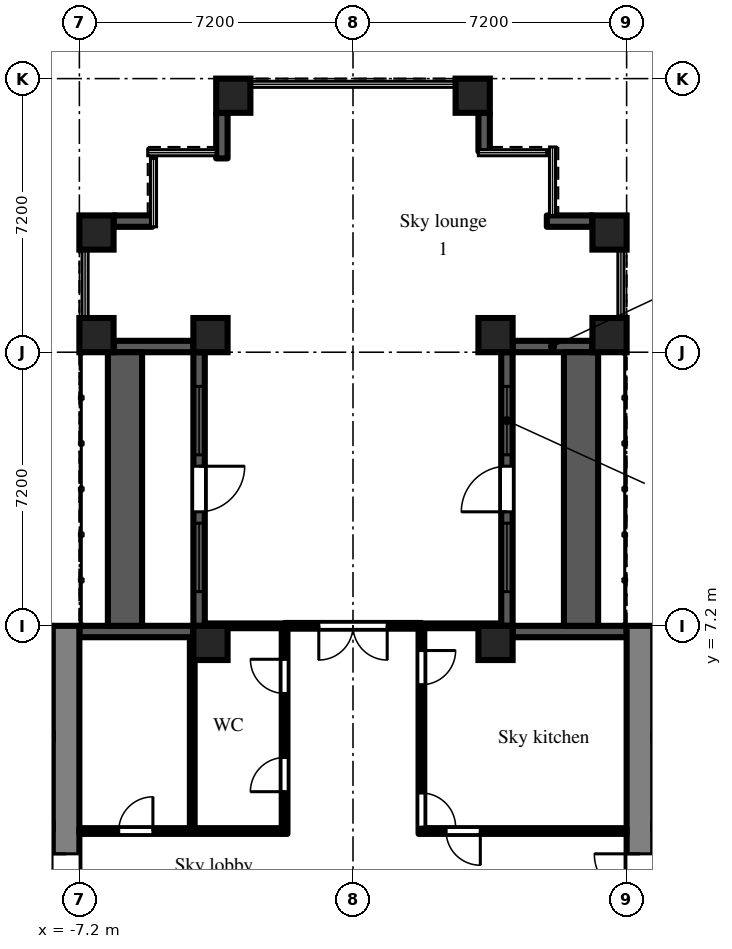
"""IFC4 building model, lengths in metres.
Left out: names, types, materials, properties, quantities, classifications, styles, units other than length and angle.
Written with IfcOpenShell. Run it as: python <this file> out.ifc"""

import sys

from ifc_helpers import new_model, si_unit, direction, frame, frame_2d, origin, origin_2d, place, context, subcontext, project, spatial, rectangle, extrude, element, fill, save


model = new_model("IFC4")
c1 = context("Model", 3, precision=1e-05, world=origin(), true_north=direction((0.0, 1.0)))
c2 = subcontext(c1, "Body", "Model", "MODEL_VIEW")
j1 = project(units=[si_unit("LENGTHUNIT", "METRE"), si_unit("PLANEANGLEUNIT", "RADIAN")], contexts=[c1])
p1 = place(None, origin())
s1 = spatial("IfcSite", under=j1, at=p1, CompositionType="ELEMENT")
p2 = place(p1, origin())
s2 = spatial("IfcBuilding", under=s1, at=p2, CompositionType="ELEMENT")
p3 = place(p2, frame((0.0, 0.0, 116.1)))
s3 = spatial("IfcBuildingStorey", under=s2, at=p3, CompositionType="ELEMENT", Elevation=116.1)
for number, where, z_axis, x_axis in (
    (1, (-6.75, 14.85, 0.0), (0.0, 0.0, 1.0), (1.0, 0.0, 0.0)),
    (2, (-6.75, 17.55, 0.0), (0.0, 0.0, 1.0), (1.0, 0.0, 0.0)),
    (3, (-3.75, 6.75, 0.0), (0.0, 0.0, 1.0), (1.0, 0.0, 0.0)),
    (4, (-3.75, 14.85, 0.0), (0.0, 0.0, 1.0), (1.0, 0.0, 0.0)),
    (5, (-3.15, 21.15, 0.0), (0.0, 0.0, 1.0), (1.0, 0.0, 0.0)),
    (6, (3.15, 21.15, 0.0), (0.0, 0.0, 1.0), (1.0, 0.0, 0.0)),
    (7, (3.75, 6.75, 0.0), (0.0, 0.0, 1.0), (1.0, 0.0, 0.0)),
    (8, (3.75, 14.85, 0.0), (0.0, 0.0, 1.0), (1.0, 0.0, 0.0)),
    (9, (6.75, 14.85, 0.0), (0.0, 0.0, 1.0), (1.0, 0.0, 0.0)),
    (10, (6.75, 17.55, 0.0), (0.0, 0.0, 1.0), (1.0, 0.0, 0.0)),
):
    element("IfcColumn", number, at=place(p3, frame(where, z_axis=z_axis, x_axis=x_axis)), inside=s3, PredefinedType="COLUMN", context=c2, shape_type="SweptSolid", body=[
        extrude(rectangle(XDim=0.9, YDim=0.9, at=origin_2d()), origin(), (0.0, 0.0, 1.0), 4.2),
    ])
p4 = place(p3, frame((7.2, 7.05, 0.0), z_axis=(0.0, 0.0, 1.0), x_axis=(-1.0, 0.0, 0.0)))
e11 = element("IfcWall", 11, at=p4, inside=s3, PredefinedType="SOLIDWALL", context=c2, shape_type="SweptSolid", body=[
    extrude(rectangle(XDim=3.0, YDim=0.3, at=frame_2d((1.5, 0.0))), origin(), (0.0, 0.0, 1.0), 3.4),
])
p5 = place(p3, frame((4.05, 7.2, 0.0), z_axis=(0.0, 0.0, 1.0), x_axis=(0.0, 1.0, 0.0)))
e12 = element("IfcWall", 12, at=p5, inside=s3, PredefinedType="SOLIDWALL", context=c2, shape_type="SweptSolid", body=[
    extrude(rectangle(XDim=7.2, YDim=0.3, at=frame_2d((3.6, 0.0))), origin(), (0.0, 0.0, 1.0), 3.4),
])
p6 = place(p5, frame((3.0, 0.0, 0.0)))
e13 = element("IfcOpeningElement", 13, at=p6, cuts=e12, PredefinedType="OPENING", context=c2, shape_type="SweptSolid", body=[
    extrude(rectangle(XDim=1.2, YDim=2.05, at=frame_2d((0.6, 1.025))), frame((0.0, 0.16, 0.0), z_axis=(0.0, -1.0, 0.0), x_axis=(1.0, 0.0, 0.0)), (0.0, 0.0, 1.0), 0.32),
])
p7 = place(p5, frame((0.9, 0.0, 0.2)))
e14 = element("IfcOpeningElement", 14, at=p7, cuts=e12, PredefinedType="OPENING", context=c2, shape_type="SweptSolid", body=[
    extrude(rectangle(XDim=1.8, YDim=1.85, at=frame_2d((0.9, 0.925))), frame((0.0, 0.16, 0.0), z_axis=(0.0, -1.0, 0.0), x_axis=(1.0, 0.0, 0.0)), (0.0, 0.0, 1.0), 0.32),
])
p8 = place(p5, frame((4.5, 0.0, 0.2)))
e15 = element("IfcOpeningElement", 15, at=p8, cuts=e12, PredefinedType="OPENING", context=c2, shape_type="SweptSolid", body=[
    extrude(rectangle(XDim=1.8, YDim=1.85, at=frame_2d((0.9, 0.925))), frame((0.0, 0.16, 0.0), z_axis=(0.0, -1.0, 0.0), x_axis=(1.0, 0.0, 0.0)), (0.0, 0.0, 1.0), 0.32),
])
p9 = place(p3, frame((4.2, 14.55, 0.0), z_axis=(0.0, 0.0, 1.0), x_axis=(1.0, 0.0, 0.0)))
e16 = element("IfcWall", 16, at=p9, inside=s3, PredefinedType="SOLIDWALL", context=c2, shape_type="SweptSolid", body=[
    extrude(rectangle(XDim=2.1, YDim=0.3, at=frame_2d((1.05, 0.0))), origin(), (0.0, 0.0, 1.0), 3.4),
])
p10 = place(p3, frame((6.3, 17.85, 0.0), z_axis=(0.0, 0.0, 1.0), x_axis=(-1.0, 0.0, 0.0)))
e17 = element("IfcWall", 17, at=p10, inside=s3, PredefinedType="SOLIDWALL", context=c2, shape_type="SweptSolid", body=[
    extrude(rectangle(XDim=1.2, YDim=0.3, at=frame_2d((0.6, 0.0))), origin(), (0.0, 0.0, 1.0), 3.8),
])
p11 = place(p3, frame((3.45, 19.68, 0.0), z_axis=(0.0, 0.0, 1.0), x_axis=(0.0, 1.0, 0.0)))
e18 = element("IfcWall", 18, at=p11, inside=s3, PredefinedType="SOLIDWALL", context=c2, shape_type="SweptSolid", body=[
    extrude(rectangle(XDim=1.02, YDim=0.3, at=frame_2d((0.51, 0.0))), origin(), (0.0, 0.0, 1.0), 3.8),
])
p12 = place(p3, frame((-3.45, 20.7, 0.0), z_axis=(0.0, 0.0, 1.0), x_axis=(0.0, -1.0, 0.0)))
e19 = element("IfcWall", 19, at=p12, inside=s3, PredefinedType="SOLIDWALL", context=c2, shape_type="SweptSolid", body=[
    extrude(rectangle(XDim=1.2, YDim=0.3, at=frame_2d((0.6, 0.0))), origin(), (0.0, 0.0, 1.0), 3.8),
])
p13 = place(p3, frame((-5.28, 17.85, 0.0), z_axis=(0.0, 0.0, 1.0), x_axis=(-1.0, 0.0, 0.0)))
e20 = element("IfcWall", 20, at=p13, inside=s3, PredefinedType="SOLIDWALL", context=c2, shape_type="SweptSolid", body=[
    extrude(rectangle(XDim=1.02, YDim=0.3, at=frame_2d((0.51, 0.0))), origin(), (0.0, 0.0, 1.0), 3.8),
])
p14 = place(p3, frame((-6.3, 14.55, 0.0), z_axis=(0.0, 0.0, 1.0), x_axis=(1.0, 0.0, 0.0)))
e21 = element("IfcWall", 21, at=p14, inside=s3, PredefinedType="SOLIDWALL", context=c2, shape_type="SweptSolid", body=[
    extrude(rectangle(XDim=2.1, YDim=0.3, at=frame_2d((1.05, 0.0))), origin(), (0.0, 0.0, 1.0), 3.4),
])
p15 = place(p3, frame((-4.05, 14.4, 0.0), z_axis=(0.0, 0.0, 1.0), x_axis=(0.0, -1.0, 0.0)))
e22 = element("IfcWall", 22, at=p15, inside=s3, PredefinedType="SOLIDWALL", context=c2, shape_type="SweptSolid", body=[
    extrude(rectangle(XDim=7.2, YDim=0.3, at=frame_2d((3.6, 0.0))), origin(), (0.0, 0.0, 1.0), 3.4),
])
p16 = place(p15, frame((3.0, 0.0, 0.0)))
e23 = element("IfcOpeningElement", 23, at=p16, cuts=e22, PredefinedType="OPENING", context=c2, shape_type="SweptSolid", body=[
    extrude(rectangle(XDim=1.2, YDim=2.05, at=frame_2d((0.6, 1.025))), frame((0.0, 0.16, 0.0), z_axis=(0.0, -1.0, 0.0), x_axis=(1.0, 0.0, 0.0)), (0.0, 0.0, 1.0), 0.32),
])
p17 = place(p15, frame((0.9, 0.0, 0.2)))
e24 = element("IfcOpeningElement", 24, at=p17, cuts=e22, PredefinedType="OPENING", context=c2, shape_type="SweptSolid", body=[
    extrude(rectangle(XDim=1.8, YDim=1.85, at=frame_2d((0.9, 0.925))), frame((0.0, 0.16, 0.0), z_axis=(0.0, -1.0, 0.0), x_axis=(1.0, 0.0, 0.0)), (0.0, 0.0, 1.0), 0.32),
])
p18 = place(p15, frame((4.5, 0.0, 0.2)))
e25 = element("IfcOpeningElement", 25, at=p18, cuts=e22, PredefinedType="OPENING", context=c2, shape_type="SweptSolid", body=[
    extrude(rectangle(XDim=1.8, YDim=1.85, at=frame_2d((0.9, 0.925))), frame((0.0, 0.16, 0.0), z_axis=(0.0, -1.0, 0.0), x_axis=(1.0, 0.0, 0.0)), (0.0, 0.0, 1.0), 0.32),
])
p19 = place(p3, frame((-4.2, 7.05, 0.0), z_axis=(0.0, 0.0, 1.0), x_axis=(-1.0, 0.0, 0.0)))
e26 = element("IfcWall", 26, at=p19, inside=s3, PredefinedType="SOLIDWALL", context=c2, shape_type="SweptSolid", body=[
    extrude(rectangle(XDim=3.0, YDim=0.3, at=frame_2d((1.5, 0.0))), origin(), (0.0, 0.0, 1.0), 3.4),
])
for number, where, z_axis, x_axis in (
    (27, (6.0, 7.2, 0.0), (0.0, 0.0, 1.0), (0.0, 1.0, 0.0)),
    (28, (-6.0, 7.2, 0.0), (0.0, 0.0, 1.0), (0.0, 1.0, 0.0)),
):
    element("IfcWall", number, at=place(p3, frame(where, z_axis=z_axis, x_axis=x_axis)), inside=s3, PredefinedType="PARAPET", context=c2, shape_type="SweptSolid", body=[
        extrude(rectangle(XDim=7.2, YDim=0.9, at=frame_2d((3.6, 0.0))), origin(), (0.0, 0.0, 1.0), 0.8),
    ])
p20 = place(p3, frame((7.55, -7.2, 0.0), z_axis=(0.0, 0.0, 1.0), x_axis=(0.0, 1.0, 0.0)))
e29 = element("IfcWall", 29, at=p20, inside=s3, PredefinedType="SHEAR", context=c2, shape_type="SweptSolid", body=[
    extrude(rectangle(XDim=14.4, YDim=0.7, at=frame_2d((7.2, 0.0))), origin(), (0.0, 0.0, 1.0), 3.8),
])
p21 = place(p20, frame((6.0, 0.0, 0.0)))
e30 = element("IfcOpeningElement", 30, at=p21, cuts=e29, PredefinedType="OPENING", context=c2, shape_type="SweptSolid", body=[
    extrude(rectangle(XDim=2.4, YDim=2.2, at=frame_2d((1.2, 1.1))), frame((0.0, 0.36, 0.0), z_axis=(0.0, -1.0, 0.0), x_axis=(1.0, 0.0, 0.0)), (0.0, 0.0, 1.0), 0.72),
])
p22 = place(p3, frame((-7.55, -7.2, 0.0), z_axis=(0.0, 0.0, 1.0), x_axis=(0.0, 1.0, 0.0)))
e31 = element("IfcWall", 31, at=p22, inside=s3, PredefinedType="SHEAR", context=c2, shape_type="SweptSolid", body=[
    extrude(rectangle(XDim=14.4, YDim=0.7, at=frame_2d((7.2, 0.0))), origin(), (0.0, 0.0, 1.0), 3.8),
])
p23 = place(p22, frame((6.0, 0.0, 0.0)))
e32 = element("IfcOpeningElement", 32, at=p23, cuts=e31, PredefinedType="OPENING", context=c2, shape_type="SweptSolid", body=[
    extrude(rectangle(XDim=2.4, YDim=2.2, at=frame_2d((1.2, 1.1))), frame((0.0, 0.36, 0.0), z_axis=(0.0, -1.0, 0.0), x_axis=(1.0, 0.0, 0.0)), (0.0, 0.0, 1.0), 0.72),
])
p24 = place(p3, frame((-7.2, 1.8, 0.0), z_axis=(0.0, 0.0, 1.0), x_axis=(1.0, 0.0, 0.0)))
e33 = element("IfcWall", 33, at=p24, inside=s3, PredefinedType="PARTITIONING", context=c2, shape_type="SweptSolid", body=[
    extrude(rectangle(XDim=5.325, YDim=0.15, at=frame_2d((2.663, 0.0))), origin(), (0.0, 0.0, 1.0), 3.8),
])
p25 = place(p24, frame((1.035, 0.0, 0.0)))
e34 = element("IfcOpeningElement", 34, at=p25, cuts=e33, PredefinedType="OPENING", context=c2, shape_type="SweptSolid", body=[
    extrude(rectangle(XDim=0.9, YDim=2.1, at=frame_2d((0.45, 1.05))), frame((0.0, 0.085, 0.0), z_axis=(0.0, -1.0, 0.0), x_axis=(1.0, 0.0, 0.0)), (0.0, 0.0, 1.0), 0.17),
])
p26 = place(p3, frame((-4.23, 1.875, 0.0), z_axis=(0.0, 0.0, 1.0), x_axis=(0.0, 1.0, 0.0)))
e35 = element("IfcWall", 35, at=p26, inside=s3, PredefinedType="PARTITIONING", context=c2, shape_type="SweptSolid", body=[
    extrude(rectangle(XDim=5.025, YDim=0.125, at=frame_2d((2.512, 0.0))), origin(), (0.0, 0.0, 1.0), 3.8),
])
p27 = place(p3, frame((-3.9, 7.2, 0.0), z_axis=(0.0, 0.0, 1.0), x_axis=(1.0, 0.0, 0.0)))
e36 = element("IfcWall", 36, at=p27, inside=s3, PredefinedType="PARTITIONING", context=c2, shape_type="SweptSolid", body=[
    extrude(rectangle(XDim=2.1, YDim=0.125, at=frame_2d((1.05, 0.0))), origin(), (0.0, 0.0, 1.0), 3.8),
])
p28 = place(p3, frame((-1.8, 1.725, 0.0), z_axis=(0.0, 0.0, 1.0), x_axis=(0.0, 1.0, 0.0)))
e37 = element("IfcWall", 37, at=p28, inside=s3, PredefinedType="PARTITIONING", context=c2, shape_type="SweptSolid", body=[
    extrude(rectangle(XDim=5.4, YDim=0.15, at=frame_2d((2.7, 0.0))), origin(), (0.0, 0.0, 1.0), 3.8),
])
p29 = place(p28, frame((1.11, 0.0, 0.0)))
e38 = element("IfcOpeningElement", 38, at=p29, cuts=e37, PredefinedType="OPENING", context=c2, shape_type="SweptSolid", body=[
    extrude(rectangle(XDim=0.9, YDim=2.1, at=frame_2d((0.45, 1.05))), frame((0.0, 0.085, 0.0), z_axis=(0.0, -1.0, 0.0), x_axis=(1.0, 0.0, 0.0)), (0.0, 0.0, 1.0), 0.17),
])
p30 = place(p28, frame((3.695, 0.0, 0.0)))
e39 = element("IfcOpeningElement", 39, at=p30, cuts=e37, PredefinedType="OPENING", context=c2, shape_type="SweptSolid", body=[
    extrude(rectangle(XDim=0.9, YDim=2.1, at=frame_2d((0.45, 1.05))), frame((0.0, 0.085, 0.0), z_axis=(0.0, -1.0, 0.0), x_axis=(1.0, 0.0, 0.0)), (0.0, 0.0, 1.0), 0.17),
])
p31 = place(p3, frame((-1.8, 7.2, 0.0), z_axis=(0.0, 0.0, 1.0), x_axis=(1.0, 0.0, 0.0)))
e40 = element("IfcWall", 40, at=p31, inside=s3, PredefinedType="PARTITIONING", context=c2, shape_type="SweptSolid", body=[
    extrude(rectangle(XDim=3.6, YDim=0.15, at=frame_2d((1.8, 0.0))), origin(), (0.0, 0.0, 1.0), 3.8),
])
p32 = place(p31, frame((0.9, 0.0, 0.0)))
e41 = element("IfcOpeningElement", 41, at=p32, cuts=e40, PredefinedType="OPENING", context=c2, shape_type="SweptSolid", body=[
    extrude(rectangle(XDim=1.8, YDim=2.1, at=frame_2d((0.9, 1.05))), frame((0.0, 0.085, 0.0), z_axis=(0.0, -1.0, 0.0), x_axis=(1.0, 0.0, 0.0)), (0.0, 0.0, 1.0), 0.17),
])
p33 = place(p3, frame((1.8, 1.725, 0.0), z_axis=(0.0, 0.0, 1.0), x_axis=(0.0, 1.0, 0.0)))
e42 = element("IfcWall", 42, at=p33, inside=s3, PredefinedType="PARTITIONING", context=c2, shape_type="SweptSolid", body=[
    extrude(rectangle(XDim=5.4, YDim=0.15, at=frame_2d((2.7, 0.0))), origin(), (0.0, 0.0, 1.0), 3.8),
])
p34 = place(p33, frame((0.175, 0.0, 0.0)))
e43 = element("IfcOpeningElement", 43, at=p34, cuts=e42, PredefinedType="OPENING", context=c2, shape_type="SweptSolid", body=[
    extrude(rectangle(XDim=0.9, YDim=2.1, at=frame_2d((0.45, 1.05))), frame((0.0, 0.085, 0.0), z_axis=(0.0, -1.0, 0.0), x_axis=(1.0, 0.0, 0.0)), (0.0, 0.0, 1.0), 0.17),
])
p35 = place(p33, frame((3.925, 0.0, 0.0)))
e44 = element("IfcOpeningElement", 44, at=p35, cuts=e42, PredefinedType="OPENING", context=c2, shape_type="SweptSolid", body=[
    extrude(rectangle(XDim=0.9, YDim=2.1, at=frame_2d((0.45, 1.05))), frame((0.0, 0.085, 0.0), z_axis=(0.0, -1.0, 0.0), x_axis=(1.0, 0.0, 0.0)), (0.0, 0.0, 1.0), 0.17),
])
p36 = place(p3, frame((1.875, 1.8, 0.0), z_axis=(0.0, 0.0, 1.0), x_axis=(1.0, 0.0, 0.0)))
e45 = element("IfcWall", 45, at=p36, inside=s3, PredefinedType="PARTITIONING", context=c2, shape_type="SweptSolid", body=[
    extrude(rectangle(XDim=5.325, YDim=0.15, at=frame_2d((2.663, 0.0))), origin(), (0.0, 0.0, 1.0), 3.8),
])
p37 = place(p36, frame((0.575, 0.0, 0.0)))
e46 = element("IfcOpeningElement", 46, at=p37, cuts=e45, PredefinedType="OPENING", context=c2, shape_type="SweptSolid", body=[
    extrude(rectangle(XDim=0.9, YDim=2.1, at=frame_2d((0.45, 1.05))), frame((0.0, 0.085, 0.0), z_axis=(0.0, -1.0, 0.0), x_axis=(1.0, 0.0, 0.0)), (0.0, 0.0, 1.0), 0.17),
])
p38 = place(p3, frame((1.8, 7.2, 0.0), z_axis=(0.0, 0.0, 1.0), x_axis=(1.0, 0.0, 0.0)))
e47 = element("IfcWall", 47, at=p38, inside=s3, PredefinedType="PARTITIONING", context=c2, shape_type="SweptSolid", body=[
    extrude(rectangle(XDim=2.1, YDim=0.125, at=frame_2d((1.05, 0.0))), origin(), (0.0, 0.0, 1.0), 3.8),
])
p39 = place(p6, origin())
e48 = element("IfcDoor", 48, at=p39, inside=s3, OperationType="SINGLE_SWING_LEFT", PredefinedType="DOOR", context=c2, shape_type="SweptSolid", body=[
    extrude(rectangle(XDim=1.2, YDim=2.05, at=frame_2d((0.6, 1.025))), frame((0.0, 0.025, 0.0), z_axis=(0.0, -1.0, 0.0), x_axis=(1.0, 0.0, 0.0)), (0.0, 0.0, 1.0), 0.05),
])
fill(e13, e48)
p40 = place(p7, origin())
e49 = element("IfcWindow", 49, at=p40, inside=s3, PartitioningType="SINGLE_PANEL", PredefinedType="WINDOW", context=c2, shape_type="SweptSolid", body=[
    extrude(rectangle(XDim=1.8, YDim=1.85, at=frame_2d((0.9, 0.925))), frame((0.0, 0.03, 0.0), z_axis=(0.0, -1.0, 0.0), x_axis=(1.0, 0.0, 0.0)), (0.0, 0.0, 1.0), 0.06),
])
fill(e14, e49)
p41 = place(p8, origin())
e50 = element("IfcWindow", 50, at=p41, inside=s3, PartitioningType="SINGLE_PANEL", PredefinedType="WINDOW", context=c2, shape_type="SweptSolid", body=[
    extrude(rectangle(XDim=1.8, YDim=1.85, at=frame_2d((0.9, 0.925))), frame((0.0, 0.03, 0.0), z_axis=(0.0, -1.0, 0.0), x_axis=(1.0, 0.0, 0.0)), (0.0, 0.0, 1.0), 0.06),
])
fill(e15, e50)
p42 = place(p16, origin())
e51 = element("IfcDoor", 51, at=p42, inside=s3, OperationType="SINGLE_SWING_LEFT", PredefinedType="DOOR", context=c2, shape_type="SweptSolid", body=[
    extrude(rectangle(XDim=1.2, YDim=2.05, at=frame_2d((0.6, 1.025))), frame((0.0, 0.025, 0.0), z_axis=(0.0, -1.0, 0.0), x_axis=(1.0, 0.0, 0.0)), (0.0, 0.0, 1.0), 0.05),
])
fill(e23, e51)
p43 = place(p17, origin())
e52 = element("IfcWindow", 52, at=p43, inside=s3, PartitioningType="SINGLE_PANEL", PredefinedType="WINDOW", context=c2, shape_type="SweptSolid", body=[
    extrude(rectangle(XDim=1.8, YDim=1.85, at=frame_2d((0.9, 0.925))), frame((0.0, 0.03, 0.0), z_axis=(0.0, -1.0, 0.0), x_axis=(1.0, 0.0, 0.0)), (0.0, 0.0, 1.0), 0.06),
])
fill(e24, e52)
p44 = place(p18, origin())
e53 = element("IfcWindow", 53, at=p44, inside=s3, PartitioningType="SINGLE_PANEL", PredefinedType="WINDOW", context=c2, shape_type="SweptSolid", body=[
    extrude(rectangle(XDim=1.8, YDim=1.85, at=frame_2d((0.9, 0.925))), frame((0.0, 0.03, 0.0), z_axis=(0.0, -1.0, 0.0), x_axis=(1.0, 0.0, 0.0)), (0.0, 0.0, 1.0), 0.06),
])
fill(e25, e53)
p45 = place(p21, origin())
e54 = element("IfcDoor", 54, at=p45, inside=s3, OperationType="DOUBLE_DOOR_DOUBLE_SWING", PredefinedType="DOOR", context=c2, shape_type="SweptSolid", body=[
    extrude(rectangle(XDim=2.4, YDim=2.2, at=frame_2d((1.2, 1.1))), frame((0.0, 0.025, 0.0), z_axis=(0.0, -1.0, 0.0), x_axis=(1.0, 0.0, 0.0)), (0.0, 0.0, 1.0), 0.05),
])
fill(e30, e54)
p46 = place(p23, origin())
e55 = element("IfcDoor", 55, at=p46, inside=s3, OperationType="DOUBLE_DOOR_DOUBLE_SWING", PredefinedType="DOOR", context=c2, shape_type="SweptSolid", body=[
    extrude(rectangle(XDim=2.4, YDim=2.2, at=frame_2d((1.2, 1.1))), frame((0.0, 0.025, 0.0), z_axis=(0.0, -1.0, 0.0), x_axis=(1.0, 0.0, 0.0)), (0.0, 0.0, 1.0), 0.05),
])
fill(e32, e55)
p47 = place(p34, frame((0.9, 0.0, 0.0), z_axis=(0.0, 0.0, 1.0), x_axis=(-1.0, 0.0, 0.0)))
e56 = element("IfcDoor", 56, at=p47, inside=s3, OperationType="SINGLE_SWING_RIGHT", PredefinedType="DOOR", context=c2, shape_type="SweptSolid", body=[
    extrude(rectangle(XDim=0.9, YDim=2.1, at=frame_2d((0.45, 1.05))), frame((0.0, 0.025, 0.0), z_axis=(0.0, -1.0, 0.0), x_axis=(1.0, 0.0, 0.0)), (0.0, 0.0, 1.0), 0.05),
])
fill(e43, e56)
p48 = place(p35, frame((0.9, 0.0, 0.0), z_axis=(0.0, 0.0, 1.0), x_axis=(-1.0, 0.0, 0.0)))
e57 = element("IfcDoor", 57, at=p48, inside=s3, OperationType="SINGLE_SWING_LEFT", PredefinedType="DOOR", context=c2, shape_type="SweptSolid", body=[
    extrude(rectangle(XDim=0.9, YDim=2.1, at=frame_2d((0.45, 1.05))), frame((0.0, 0.025, 0.0), z_axis=(0.0, -1.0, 0.0), x_axis=(1.0, 0.0, 0.0)), (0.0, 0.0, 1.0), 0.05),
])
fill(e44, e57)
p49 = place(p37, frame((0.9, 0.0, 0.0), z_axis=(0.0, 0.0, 1.0), x_axis=(-1.0, 0.0, 0.0)))
e58 = element("IfcDoor", 58, at=p49, inside=s3, OperationType="SINGLE_SWING_LEFT", PredefinedType="DOOR", context=c2, shape_type="SweptSolid", body=[
    extrude(rectangle(XDim=0.9, YDim=2.1, at=frame_2d((0.45, 1.05))), frame((0.0, 0.025, 0.0), z_axis=(0.0, -1.0, 0.0), x_axis=(1.0, 0.0, 0.0)), (0.0, 0.0, 1.0), 0.05),
])
fill(e46, e58)
p50 = place(p29, origin())
e59 = element("IfcDoor", 59, at=p50, inside=s3, OperationType="SINGLE_SWING_LEFT", PredefinedType="DOOR", context=c2, shape_type="SweptSolid", body=[
    extrude(rectangle(XDim=0.9, YDim=2.1, at=frame_2d((0.45, 1.05))), frame((0.0, 0.025, 0.0), z_axis=(0.0, -1.0, 0.0), x_axis=(1.0, 0.0, 0.0)), (0.0, 0.0, 1.0), 0.05),
])
fill(e38, e59)
p51 = place(p30, origin())
e60 = element("IfcDoor", 60, at=p51, inside=s3, OperationType="SINGLE_SWING_RIGHT", PredefinedType="DOOR", context=c2, shape_type="SweptSolid", body=[
    extrude(rectangle(XDim=0.9, YDim=2.1, at=frame_2d((0.45, 1.05))), frame((0.0, 0.025, 0.0), z_axis=(0.0, -1.0, 0.0), x_axis=(1.0, 0.0, 0.0)), (0.0, 0.0, 1.0), 0.05),
])
fill(e39, e60)
p52 = place(p25, origin())
e61 = element("IfcDoor", 61, at=p52, inside=s3, OperationType="SINGLE_SWING_RIGHT", PredefinedType="DOOR", context=c2, shape_type="SweptSolid", body=[
    extrude(rectangle(XDim=0.9, YDim=2.1, at=frame_2d((0.45, 1.05))), frame((0.0, 0.025, 0.0), z_axis=(0.0, -1.0, 0.0), x_axis=(1.0, 0.0, 0.0)), (0.0, 0.0, 1.0), 0.05),
])
fill(e34, e61)
p53 = place(p32, frame((1.8, 0.0, 0.0), z_axis=(0.0, 0.0, 1.0), x_axis=(-1.0, 0.0, 0.0)))
e62 = element("IfcDoor", 62, at=p53, inside=s3, OperationType="DOUBLE_DOOR_DOUBLE_SWING", PredefinedType="DOOR", context=c2, shape_type="SweptSolid", body=[
    extrude(rectangle(XDim=1.8, YDim=2.1, at=frame_2d((0.9, 1.05))), frame((0.0, 0.025, 0.0), z_axis=(0.0, -1.0, 0.0), x_axis=(1.0, 0.0, 0.0)), (0.0, 0.0, 1.0), 0.05),
])
fill(e41, e62)
save(model, sys.argv[1])
